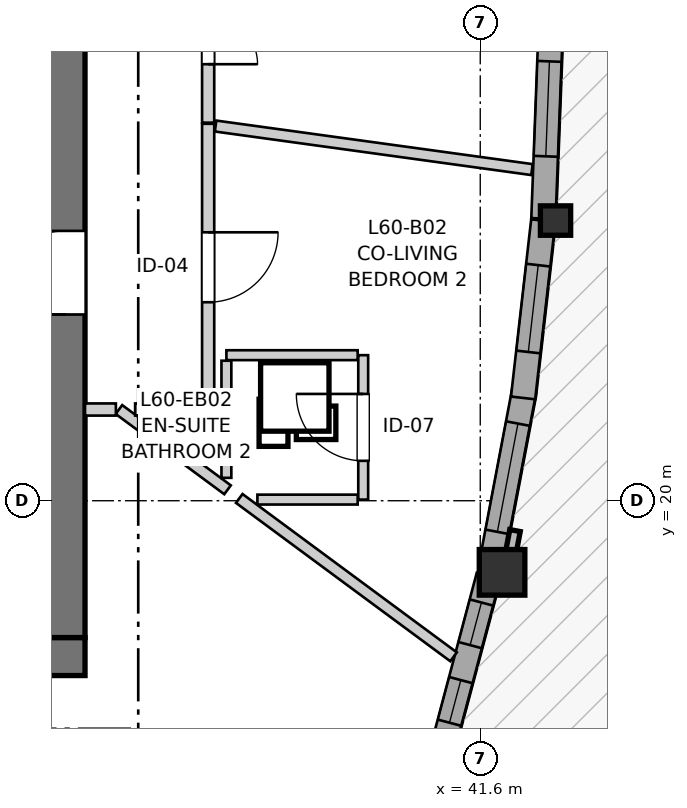
"""IFC4 building model, lengths in metres.
Left out: names, types, materials, properties, quantities, classifications, styles, units other than length and angle.
Written with IfcOpenShell. Run it as: python <this file> out.ifc"""

import sys

from ifc_helpers import new_model, si_unit, direction, frame, frame_2d, origin, origin_2d, place, context, subcontext, project, spatial, rectangle, i_section, extrude, source, transform, mapped, element, fill, save


model = new_model("IFC4")
c1 = context("Model", 3, precision=1e-05, world=origin(), true_north=direction((0.0, 1.0)))
c2 = subcontext(c1, "Body", "Model", "MODEL_VIEW")
j1 = project(units=[si_unit("LENGTHUNIT", "METRE"), si_unit("PLANEANGLEUNIT", "RADIAN")], contexts=[c1])
p1 = place(None, origin())
s1 = spatial("IfcSite", under=j1, at=p1, CompositionType="ELEMENT")
p2 = place(p1, origin())
s2 = spatial("IfcBuilding", under=s1, at=p2, CompositionType="ELEMENT")
p3 = place(p2, frame((0.0, 0.0, 202.0)))
s3 = spatial("IfcBuildingStorey", under=s2, at=p3, CompositionType="ELEMENT", Elevation=202.0)
p4 = place(p3, frame((24.3, 17.95, 0.0), z_axis=(0.0, 0.0, 1.0), x_axis=(1.0, 0.0, 0.0)))
e1 = element("IfcWall", 1, at=p4, inside=s3, PredefinedType="SHEAR", context=c2, shape_type="SweptSolid", body=[
    extrude(rectangle(XDim=12.1, YDim=0.5, at=frame_2d((6.05, 0.0))), origin(), (0.0, 0.0, 1.0), 2.935),
])
p5 = place(p3, frame((36.15, 18.2, 0.0), z_axis=(0.0, 0.0, 1.0), x_axis=(0.0, 1.0, 0.0)))
e2 = element("IfcWall", 2, at=p5, inside=s3, PredefinedType="SHEAR", context=c2, shape_type="SweptSolid", body=[
    extrude(rectangle(XDim=15.6, YDim=0.5, at=frame_2d((7.8, 0.0))), origin(), (0.0, 0.0, 1.0), 2.935),
])
p6 = place(p5, frame((4.25, 0.0, 0.0)))
e3 = element("IfcOpeningElement", 3, at=p6, cuts=e2, PredefinedType="OPENING", context=c2, shape_type="SweptSolid", body=[
    extrude(rectangle(XDim=1.1, YDim=2.15, at=frame_2d((0.55, 1.075))), frame((0.0, 0.26, 0.0), z_axis=(0.0, -1.0, 0.0), x_axis=(1.0, 0.0, 0.0)), (0.0, 0.0, 1.0), 0.52),
])
p7 = place(p5, frame((10.25, 0.0, 0.0)))
e4 = element("IfcOpeningElement", 4, at=p7, cuts=e2, PredefinedType="OPENING", context=c2, shape_type="SweptSolid", body=[
    extrude(rectangle(XDim=1.1, YDim=2.15, at=frame_2d((0.55, 1.075))), frame((0.0, 0.26, 0.0), z_axis=(0.0, -1.0, 0.0), x_axis=(1.0, 0.0, 0.0)), (0.0, 0.0, 1.0), 0.52),
])
m1 = source(origin(), c2, "Body", "SweptSolid", [
    extrude(rectangle(XDim=0.6, YDim=0.6, at=origin_2d()), origin(), (0.0, 0.0, 1.0), 2.935),
])
p8 = place(p3, frame((41.887, 19.058, 0.0), z_axis=(0.0, 0.0, 1.0), x_axis=(1.0, 0.0, 0.0)))
e5 = element("IfcColumn", 5, at=p8, inside=s3, PredefinedType="COLUMN", context=c2, shape_type="MappedRepresentation", body=[
    mapped(m1, transform((0.0, 0.0, 0.0), x_axis=(1.0, 0.0, 0.0), y_axis=(0.0, 1.0, 0.0), z_axis=(0.0, 0.0, 1.0), scale=1.0)),
])
m2 = source(origin(), c2, "Body", "SweptSolid", [
    extrude(i_section(OverallWidth=0.398, OverallDepth=0.387, WebThickness=0.019, FlangeThickness=0.03, FilletRadius=0.015, at=origin_2d()), origin(), (0.0, 0.0, 1.0), 2.935),
])
p9 = place(p3, frame((42.59, 23.686, 0.0), z_axis=(0.0, 0.0, 1.0), x_axis=(1.0, 0.0, 0.0)))
e6 = element("IfcColumn", 6, at=p9, inside=s3, PredefinedType="PILASTER", context=c2, shape_type="MappedRepresentation", body=[
    mapped(m2, transform((0.0, 0.0, 0.0), x_axis=(1.0, 0.0, 0.0), y_axis=(0.0, 1.0, 0.0), z_axis=(0.0, 0.0, 1.0), scale=1.0)),
])
p10 = place(p3, frame((41.107, 16.748, 0.0), z_axis=(0.0, 0.0, 1.0), x_axis=(0.257000958827, 0.966411148095, 0.0)))
e7 = element("IfcWall", 7, at=p10, inside=s3, PredefinedType="SOLIDWALL", context=c2, shape_type="SweptSolid", body=[
    extrude(rectangle(XDim=2.343, YDim=0.32, at=frame_2d((1.171, 0.0))), origin(), (0.0, 0.0, 1.0), 2.555),
])
p11 = place(p10, frame((0.343, 0.0, 0.82)))
e8 = element("IfcOpeningElement", 8, at=p11, cuts=e7, PredefinedType="OPENING", context=c2, shape_type="SweptSolid", body=[
    extrude(rectangle(XDim=0.58, YDim=1.35, at=frame_2d((0.29, 0.675))), frame((0.0, 0.17, 0.0), z_axis=(0.0, -1.0, 0.0), x_axis=(1.0, 0.0, 0.0)), (0.0, 0.0, 1.0), 0.34),
])
p12 = place(p10, frame((1.399, 0.0, 0.82)))
e9 = element("IfcOpeningElement", 9, at=p12, cuts=e7, PredefinedType="OPENING", context=c2, shape_type="SweptSolid", body=[
    extrude(rectangle(XDim=0.58, YDim=1.35, at=frame_2d((0.29, 0.675))), frame((0.0, 0.17, 0.0), z_axis=(0.0, -1.0, 0.0), x_axis=(1.0, 0.0, 0.0)), (0.0, 0.0, 1.0), 0.34),
])
p13 = place(p3, frame((41.747, 19.176, 0.0), z_axis=(0.0, 0.0, 1.0), x_axis=(0.186649393072, 0.982426589657, 0.0)))
e10 = element("IfcWall", 10, at=p13, inside=s3, PredefinedType="SOLIDWALL", context=c2, shape_type="SweptSolid", body=[
    extrude(rectangle(XDim=2.303, YDim=0.32, at=frame_2d((1.152, 0.0))), origin(), (0.0, 0.0, 1.0), 2.555),
])
p14 = place(p13, frame((0.422, 0.0, 0.82)))
e11 = element("IfcOpeningElement", 11, at=p14, cuts=e10, PredefinedType="OPENING", context=c2, shape_type="SweptSolid", body=[
    extrude(rectangle(XDim=1.45, YDim=1.25, at=frame_2d((0.725, 0.625))), frame((0.0, 0.17, 0.0), z_axis=(0.0, -1.0, 0.0), x_axis=(1.0, 0.0, 0.0)), (0.0, 0.0, 1.0), 0.34),
])
p15 = place(p3, frame((42.163, 21.352, 0.0), z_axis=(0.0, 0.0, 1.0), x_axis=(0.113273764078, 0.993563814947, 0.0)))
e12 = element("IfcWall", 12, at=p15, inside=s3, PredefinedType="SOLIDWALL", context=c2, shape_type="SweptSolid", body=[
    extrude(rectangle(XDim=2.347, YDim=0.32, at=frame_2d((1.174, 0.0))), origin(), (0.0, 0.0, 1.0), 2.555),
])
p16 = place(p15, frame((0.608, 0.0, 0.82)))
e13 = element("IfcOpeningElement", 13, at=p16, cuts=e12, PredefinedType="OPENING", context=c2, shape_type="SweptSolid", body=[
    extrude(rectangle(XDim=1.15, YDim=1.2, at=frame_2d((0.575, 0.6))), frame((0.0, 0.17, 0.0), z_axis=(0.0, -1.0, 0.0), x_axis=(1.0, 0.0, 0.0)), (0.0, 0.0, 1.0), 0.34),
])
p17 = place(p3, frame((42.431, 23.712, 0.0), z_axis=(0.0, 0.0, 1.0), x_axis=(0.037979071107, 0.999278534823, 0.0)))
e14 = element("IfcWall", 14, at=p17, inside=s3, PredefinedType="SOLIDWALL", context=c2, shape_type="SweptSolid", body=[
    extrude(rectangle(XDim=2.333, YDim=0.32, at=frame_2d((1.167, 0.0))), origin(), (0.0, 0.0, 1.0), 2.555),
])
p18 = place(p17, frame((0.82, 0.0, 0.82)))
e15 = element("IfcOpeningElement", 15, at=p18, cuts=e14, PredefinedType="OPENING", context=c2, shape_type="SweptSolid", body=[
    extrude(rectangle(XDim=1.25, YDim=1.35, at=frame_2d((0.625, 0.675))), frame((0.0, 0.17, 0.0), z_axis=(0.0, -1.0, 0.0), x_axis=(1.0, 0.0, 0.0)), (0.0, 0.0, 1.0), 0.34),
])
p19 = place(p3, frame((38.02, 24.959, 0.0), z_axis=(0.0, 0.0, 1.0), x_axis=(0.0, -1.0, 0.0)))
e16 = element("IfcWall", 16, at=p19, inside=s3, PredefinedType="PARTITIONING", context=c2, shape_type="SweptSolid", body=[
    extrude(rectangle(XDim=3.759, YDim=0.16, at=frame_2d((1.879, 0.0))), origin(), (0.0, 0.0, 1.0), 2.935),
])
p20 = place(p19, frame((1.427, 0.0, 0.0)))
e17 = element("IfcOpeningElement", 17, at=p20, cuts=e16, PredefinedType="OPENING", context=c2, shape_type="SweptSolid", body=[
    extrude(rectangle(XDim=0.92, YDim=2.1, at=frame_2d((0.46, 1.05))), frame((0.0, 0.09, 0.0), z_axis=(0.0, -1.0, 0.0), x_axis=(1.0, 0.0, 0.0)), (0.0, 0.0, 1.0), 0.18),
])
p21 = place(p3, frame((38.02, 27.813, 0.0), z_axis=(0.0, 0.0, 1.0), x_axis=(0.0, -1.0, 0.0)))
e18 = element("IfcWall", 18, at=p21, inside=s3, PredefinedType="PARTITIONING", context=c2, shape_type="SweptSolid", body=[
    extrude(rectangle(XDim=2.839, YDim=0.16, at=frame_2d((1.419, 0.0))), origin(), (0.0, 0.0, 1.0), 2.935),
])
p22 = place(p21, frame((0.77, 0.0, 0.0)))
e19 = element("IfcOpeningElement", 19, at=p22, cuts=e18, PredefinedType="OPENING", context=c2, shape_type="SweptSolid", body=[
    extrude(rectangle(XDim=1.3, YDim=2.1, at=frame_2d((0.65, 1.05))), frame((0.0, 0.09, 0.0), z_axis=(0.0, -1.0, 0.0), x_axis=(1.0, 0.0, 0.0)), (0.0, 0.0, 1.0), 0.18),
])
p23 = place(p3, frame((40.06, 20.015, 0.0), z_axis=(0.0, 0.0, 1.0), x_axis=(0.0, 1.0, 0.0)))
e20 = element("IfcWall", 20, at=p23, inside=s3, PredefinedType="PARTITIONING", context=c2, shape_type="SweptSolid", body=[
    extrude(rectangle(XDim=1.9, YDim=0.13, at=frame_2d((0.95, 0.0))), origin(), (0.0, 0.0, 1.0), 2.573),
])
p24 = place(p23, frame((0.51, 0.0, 0.0)))
e21 = element("IfcOpeningElement", 21, at=p24, cuts=e20, PredefinedType="OPENING", context=c2, shape_type="SweptSolid", body=[
    extrude(rectangle(XDim=0.88, YDim=2.05, at=frame_2d((0.44, 1.025))), frame((0.0, 0.075, 0.0), z_axis=(0.0, -1.0, 0.0), x_axis=(1.0, 0.0, 0.0)), (0.0, 0.0, 1.0), 0.15),
])
p25 = place(p3, frame((38.118, 24.929, 0.0), z_axis=(0.0, 0.0, 1.0), x_axis=(0.990658246077, -0.136368029533, 0.0)))
e22 = element("IfcWall", 22, at=p25, inside=s3, PredefinedType="PARTITIONING", context=c2, shape_type="SweptSolid", body=[
    extrude(rectangle(XDim=4.202, YDim=0.145, at=frame_2d((2.101, 0.0))), origin(), (0.0, 0.0, 1.0), 2.935),
])
p26 = place(p3, frame((38.429, 20.03, 0.0), z_axis=(0.0, 0.0, 1.0), x_axis=(0.804249944798, -0.594291196546, 0.0)))
e23 = element("IfcWall", 23, at=p26, inside=s3, PredefinedType="PARTITIONING", context=c2, shape_type="SweptSolid", body=[
    extrude(rectangle(XDim=3.506, YDim=0.145, at=frame_2d((1.753, 0.0))), origin(), (0.0, 0.0, 1.0), 2.935),
])
p27 = place(p3, frame((38.26, 21.915, 0.0), z_axis=(0.0, 0.0, 1.0), x_axis=(1.0, 0.0, 0.0)))
e24 = element("IfcWall", 24, at=p27, inside=s3, PredefinedType="PARTITIONING", context=c2, shape_type="SweptSolid", body=[
    extrude(rectangle(XDim=1.727, YDim=0.13, at=frame_2d((0.864, 0.0))), origin(), (0.0, 0.0, 1.0), 2.935),
])
p28 = place(p3, frame((36.846, 21.2, 0.0), z_axis=(0.0, 0.0, 1.0), x_axis=(0.804250382672, -0.594290603974, 0.0)))
e25 = element("IfcWall", 25, at=p28, inside=s3, PredefinedType="PARTITIONING", context=c2, shape_type="SweptSolid", body=[
    extrude(rectangle(XDim=1.777, YDim=0.145, at=frame_2d((0.888, 0.0))), origin(), (0.0, 0.0, 1.0), 2.935),
])
p29 = place(p3, frame((38.26, 20.301, 0.0), z_axis=(0.0, 0.0, 1.0), x_axis=(0.0, 1.0, 0.0)))
e26 = element("IfcWall", 26, at=p29, inside=s3, PredefinedType="PARTITIONING", context=c2, shape_type="SweptSolid", body=[
    extrude(rectangle(XDim=1.541, YDim=0.13, at=frame_2d((0.771, 0.0))), origin(), (0.0, 0.0, 1.0), 2.603),
])
p30 = place(p3, frame((38.668, 20.015, 0.0), z_axis=(0.0, 0.0, 1.0), x_axis=(1.0, 0.0, 0.0)))
e27 = element("IfcWall", 27, at=p30, inside=s3, PredefinedType="PARTITIONING", context=c2, shape_type="SweptSolid", body=[
    extrude(rectangle(XDim=1.319, YDim=0.13, at=frame_2d((0.66, 0.0))), origin(), (0.0, 0.0, 1.0), 2.935),
])
p31 = place(p3, frame((37.059, 21.2, 0.0), z_axis=(0.0, 0.0, 1.0), x_axis=(1.0, 0.0, 0.0)))
e28 = element("IfcWall", 28, at=p31, inside=s3, PredefinedType="PARTITIONING", context=c2, shape_type="SweptSolid", body=[
    extrude(rectangle(XDim=0.873, YDim=0.16, at=frame_2d((0.437, 0.0))), origin(), (0.0, 0.0, 1.0), 2.935),
])
p32 = place(p3, frame((36.4, 21.2, 0.0), z_axis=(0.0, 0.0, 1.0), x_axis=(1.0, 0.0, 0.0)))
e29 = element("IfcWall", 29, at=p32, inside=s3, PredefinedType="PARTITIONING", context=c2, shape_type="SweptSolid", body=[
    extrude(rectangle(XDim=0.406, YDim=0.16, at=frame_2d((0.203, 0.0))), origin(), (0.0, 0.0, 1.0), 2.935),
])
m3 = source(origin(), c2, "Body", "SweptSolid", [
    extrude(rectangle(XDim=0.58, YDim=1.35, at=frame_2d((0.29, 0.675))), frame((0.0, 0.03, 0.0), z_axis=(0.0, -1.0, 0.0), x_axis=(1.0, 0.0, 0.0)), (0.0, 0.0, 1.0), 0.06),
])
p33 = place(p11, origin())
e30 = element("IfcWindow", 30, at=p33, inside=s3, PartitioningType="SINGLE_PANEL", PredefinedType="WINDOW", context=c2, shape_type="MappedRepresentation", body=[
    mapped(m3, transform((0.0, 0.0, 0.0), x_axis=(1.0, 0.0, 0.0), y_axis=(0.0, 1.0, 0.0), z_axis=(0.0, 0.0, 1.0), scale=1.0)),
])
fill(e8, e30)
p34 = place(p12, origin())
e31 = element("IfcWindow", 31, at=p34, inside=s3, PartitioningType="SINGLE_PANEL", PredefinedType="WINDOW", context=c2, shape_type="MappedRepresentation", body=[
    mapped(m3, transform((0.0, 0.0, 0.0), x_axis=(1.0, 0.0, 0.0), y_axis=(0.0, 1.0, 0.0), z_axis=(0.0, 0.0, 1.0), scale=1.0)),
])
fill(e9, e31)
m4 = source(origin(), c2, "Body", "SweptSolid", [
    extrude(rectangle(XDim=1.45, YDim=1.25, at=frame_2d((0.725, 0.625))), frame((0.0, 0.03, 0.0), z_axis=(0.0, -1.0, 0.0), x_axis=(1.0, 0.0, 0.0)), (0.0, 0.0, 1.0), 0.06),
])
p35 = place(p14, origin())
e32 = element("IfcWindow", 32, at=p35, inside=s3, PartitioningType="SINGLE_PANEL", PredefinedType="WINDOW", context=c2, shape_type="MappedRepresentation", body=[
    mapped(m4, transform((0.0, 0.0, 0.0), x_axis=(1.0, 0.0, 0.0), y_axis=(0.0, 1.0, 0.0), z_axis=(0.0, 0.0, 1.0), scale=1.0)),
])
fill(e11, e32)
m5 = source(origin(), c2, "Body", "SweptSolid", [
    extrude(rectangle(XDim=1.15, YDim=1.2, at=frame_2d((0.575, 0.6))), frame((0.0, 0.03, 0.0), z_axis=(0.0, -1.0, 0.0), x_axis=(1.0, 0.0, 0.0)), (0.0, 0.0, 1.0), 0.06),
])
p36 = place(p16, origin())
e33 = element("IfcWindow", 33, at=p36, inside=s3, PartitioningType="SINGLE_PANEL", PredefinedType="WINDOW", context=c2, shape_type="MappedRepresentation", body=[
    mapped(m5, transform((0.0, 0.0, 0.0), x_axis=(1.0, 0.0, 0.0), y_axis=(0.0, 1.0, 0.0), z_axis=(0.0, 0.0, 1.0), scale=1.0)),
])
fill(e13, e33)
m6 = source(origin(), c2, "Body", "SweptSolid", [
    extrude(rectangle(XDim=1.25, YDim=1.35, at=frame_2d((0.625, 0.675))), frame((0.0, 0.03, 0.0), z_axis=(0.0, -1.0, 0.0), x_axis=(1.0, 0.0, 0.0)), (0.0, 0.0, 1.0), 0.06),
])
p37 = place(p18, origin())
e34 = element("IfcWindow", 34, at=p37, inside=s3, PartitioningType="SINGLE_PANEL", PredefinedType="WINDOW", context=c2, shape_type="MappedRepresentation", body=[
    mapped(m6, transform((0.0, 0.0, 0.0), x_axis=(1.0, 0.0, 0.0), y_axis=(0.0, 1.0, 0.0), z_axis=(0.0, 0.0, 1.0), scale=1.0)),
])
fill(e15, e34)
m7 = source(origin(), c2, "Body", "SweptSolid", [
    extrude(rectangle(XDim=1.1, YDim=2.15, at=frame_2d((0.55, 1.075))), frame((0.0, 0.025, 0.0), z_axis=(0.0, -1.0, 0.0), x_axis=(1.0, 0.0, 0.0)), (0.0, 0.0, 1.0), 0.05),
])
p38 = place(p6, origin())
e35 = element("IfcDoor", 35, at=p38, inside=s3, OperationType="SINGLE_SWING_LEFT", PredefinedType="DOOR", context=c2, shape_type="MappedRepresentation", body=[
    mapped(m7, transform((0.0, 0.0, 0.0), x_axis=(1.0, 0.0, 0.0), y_axis=(0.0, 1.0, 0.0), z_axis=(0.0, 0.0, 1.0), scale=1.0)),
])
fill(e3, e35)
m8 = source(origin(), c2, "Body", "SweptSolid", [
    extrude(rectangle(XDim=0.92, YDim=2.1, at=frame_2d((0.46, 1.05))), frame((0.0, 0.025, 0.0), z_axis=(0.0, -1.0, 0.0), x_axis=(1.0, 0.0, 0.0)), (0.0, 0.0, 1.0), 0.05),
])
p39 = place(p20, origin())
e36 = element("IfcDoor", 36, at=p39, inside=s3, OperationType="SINGLE_SWING_LEFT", PredefinedType="DOOR", context=c2, shape_type="MappedRepresentation", body=[
    mapped(m8, transform((0.0, 0.0, 0.0), x_axis=(1.0, 0.0, 0.0), y_axis=(0.0, 1.0, 0.0), z_axis=(0.0, 0.0, 1.0), scale=1.0)),
])
fill(e17, e36)
m9 = source(origin(), c2, "Body", "SweptSolid", [
    extrude(rectangle(XDim=1.3, YDim=2.1, at=frame_2d((0.65, 1.05))), frame((0.0, 0.025, 0.0), z_axis=(0.0, -1.0, 0.0), x_axis=(1.0, 0.0, 0.0)), (0.0, 0.0, 1.0), 0.05),
])
p40 = place(p22, origin())
e37 = element("IfcDoor", 37, at=p40, inside=s3, OperationType="DOUBLE_DOOR_SINGLE_SWING", PredefinedType="DOOR", context=c2, shape_type="MappedRepresentation", body=[
    mapped(m9, transform((0.0, 0.0, 0.0), x_axis=(1.0, 0.0, 0.0), y_axis=(0.0, 1.0, 0.0), z_axis=(0.0, 0.0, 1.0), scale=1.0)),
])
fill(e19, e37)
m10 = source(origin(), c2, "Body", "SweptSolid", [
    extrude(rectangle(XDim=0.88, YDim=2.05, at=frame_2d((0.44, 1.025))), frame((0.0, 0.025, 0.0), z_axis=(0.0, -1.0, 0.0), x_axis=(1.0, 0.0, 0.0)), (0.0, 0.0, 1.0), 0.05),
])
p41 = place(p24, origin())
e38 = element("IfcDoor", 38, at=p41, inside=s3, OperationType="SINGLE_SWING_RIGHT", PredefinedType="DOOR", context=c2, shape_type="MappedRepresentation", body=[
    mapped(m10, transform((0.0, 0.0, 0.0), x_axis=(1.0, 0.0, 0.0), y_axis=(0.0, 1.0, 0.0), z_axis=(0.0, 0.0, 1.0), scale=1.0)),
])
fill(e21, e38)
save(model, sys.argv[1])
